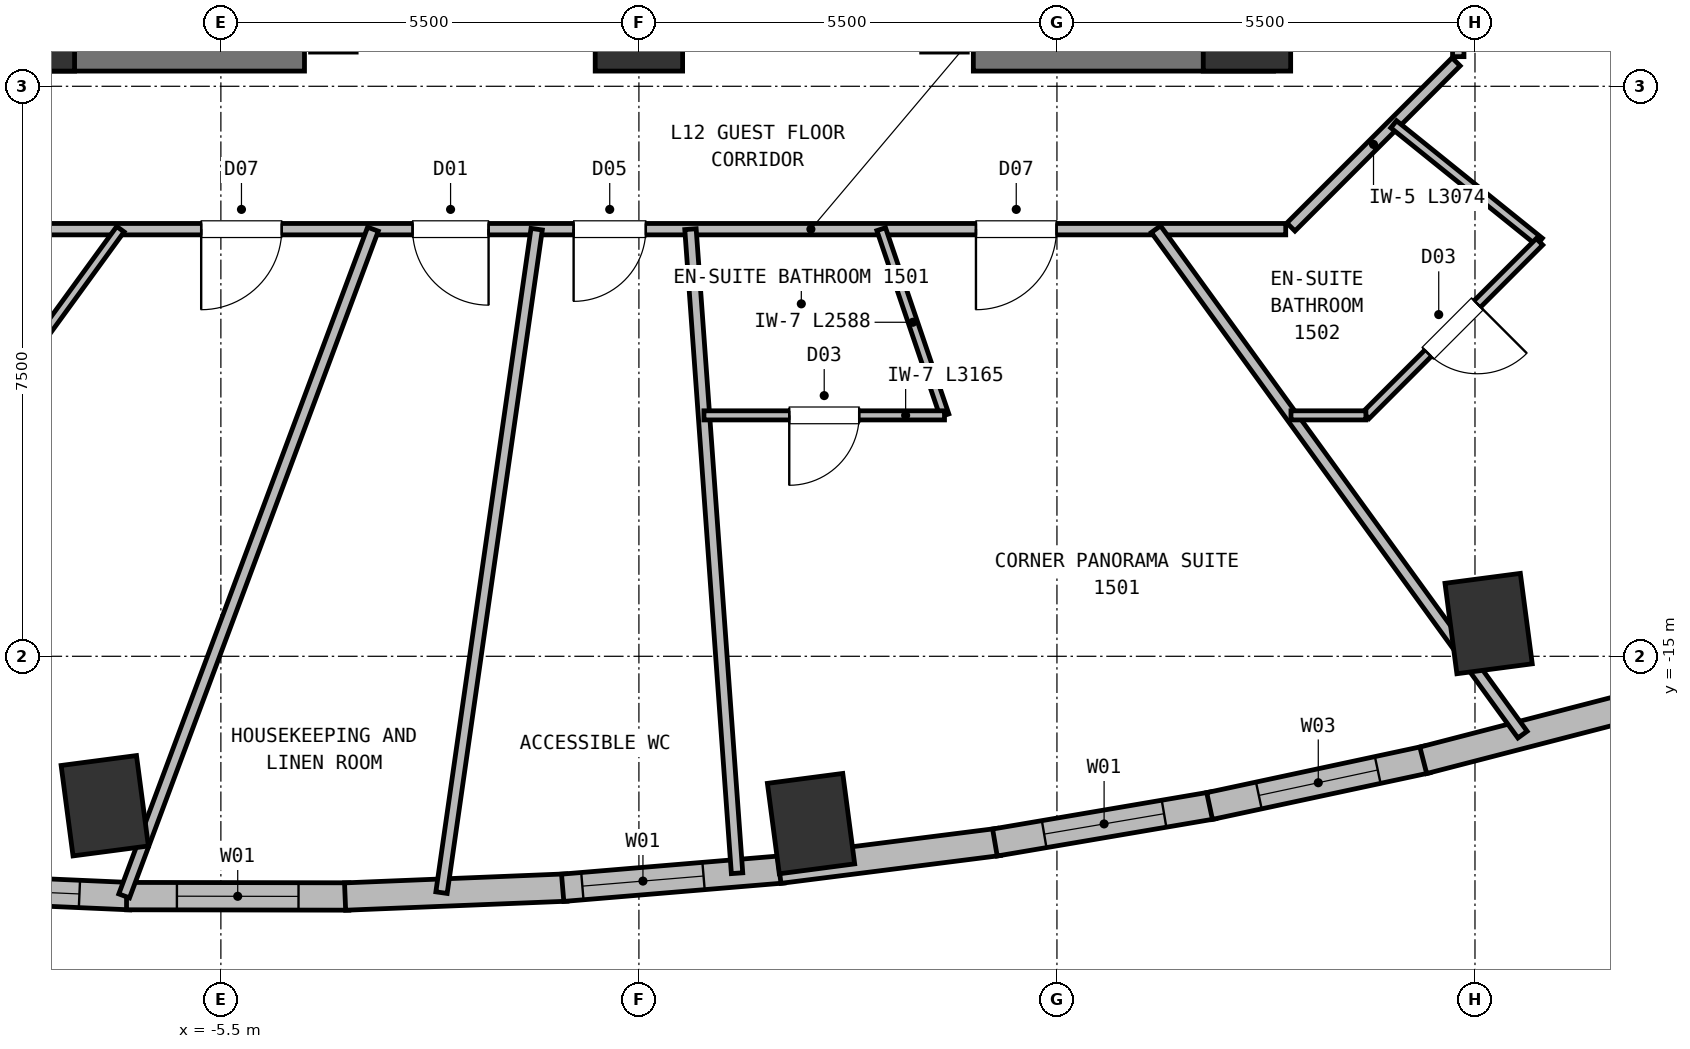
"""IFC4 building model, lengths in metres.
Left out: names, types, materials, properties, quantities, classifications, styles, units other than length and angle.
Written with IfcOpenShell. Run it as: python <this file> out.ifc"""

import sys

from ifc_helpers import new_model, si_unit, direction, frame, frame_2d, origin, origin_2d, place, context, subcontext, project, spatial, rectangle, extrude, element, fill, save


model = new_model("IFC4")
c1 = context("Model", 3, precision=1e-05, world=origin(), true_north=direction((0.0, 1.0)))
c2 = subcontext(c1, "Body", "Model", "MODEL_VIEW")
j1 = project(units=[si_unit("LENGTHUNIT", "METRE"), si_unit("PLANEANGLEUNIT", "RADIAN")], contexts=[c1])
p1 = place(None, origin())
s1 = spatial("IfcSite", under=j1, at=p1, CompositionType="ELEMENT")
p2 = place(p1, origin())
s2 = spatial("IfcBuilding", under=s1, at=p2, CompositionType="ELEMENT")
p3 = place(p2, frame((0.0, 0.0, 53.0)))
s3 = spatial("IfcBuildingStorey", under=s2, at=p3, CompositionType="ELEMENT", Elevation=53.0)
for number, where, z_axis, x_axis in (
    (1, (-8.0, -6.6, 0.0), (0.0, 0.0, 1.0), (1.0, 0.0, 0.0)),
    (2, (0.0, -6.6, 0.0), (0.0, 0.0, 1.0), (1.0, 0.0, 0.0)),
    (3, (8.0, -6.6, 0.0), (0.0, 0.0, 1.0), (1.0, 0.0, 0.0)),
):
    element("IfcColumn", number, at=place(p3, frame(where, z_axis=z_axis, x_axis=x_axis)), inside=s3, PredefinedType="COLUMN", context=c2, shape_type="SweptSolid", body=[
        extrude(rectangle(XDim=1.15, YDim=1.4, at=origin_2d()), origin(), (0.0, 0.0, 1.0), 3.75),
    ])
for number, where, z_axis, x_axis in (
    (4, (-8.35, -6.95, 0.0), (0.0, 0.0, 1.0), (1.0, 0.0, 0.0)),
    (5, (4.4, -6.95, 0.0), (0.0, 0.0, 1.0), (1.0, 0.0, 0.0)),
):
    element("IfcWall", number, at=place(p3, frame(where, z_axis=z_axis, x_axis=x_axis)), inside=s3, PredefinedType="SHEAR", context=c2, shape_type="SweptSolid", body=[
        extrude(rectangle(XDim=3.95, YDim=0.7, at=frame_2d((1.975, 0.0))), origin(), (0.0, 0.0, 1.0), 3.5),
    ])
for number, where, z_axis, x_axis in (
    (6, (-7.028, -16.966, 0.0), (0.0, 0.0, 1.0), (0.991, 0.131, 0.0)),
    (7, (2.265, -17.202, 0.0), (0.0, 0.0, 1.0), (0.991, 0.131, 0.0)),
    (8, (11.179, -14.569, 0.0), (0.0, 0.0, 1.0), (0.991, 0.131, 0.0)),
):
    element("IfcColumn", number, at=place(p3, frame(where, z_axis=z_axis, x_axis=x_axis)), inside=s3, PredefinedType="COLUMN", context=c2, shape_type="SweptSolid", body=[
        extrude(rectangle(XDim=1.0, YDim=1.2, at=origin_2d()), origin(), (0.0, 0.0, 1.0), 3.75),
    ])
p4 = place(p3, frame((-6.691, -18.156, 0.0), z_axis=(0.0, 0.0, 1.0), x_axis=(-0.999038849602, 0.043833514425, 0.0)))
e9 = element("IfcWall", 9, at=p4, inside=s3, PredefinedType="SOLIDWALL", context=c2, shape_type="SweptSolid", body=[
    extrude(rectangle(XDim=2.941, YDim=0.36, at=frame_2d((1.47, 0.0))), origin(), (0.0, 0.0, 1.0), 3.5),
])
p5 = place(p4, frame((0.67, 0.0, 0.72)))
e10 = element("IfcOpeningElement", 10, at=p5, cuts=e9, PredefinedType="OPENING", context=c2, shape_type="SweptSolid", body=[
    extrude(rectangle(XDim=1.6, YDim=1.88, at=frame_2d((0.8, 0.94))), frame((0.0, 0.19, 0.0), z_axis=(0.0, -1.0, 0.0), x_axis=(1.0, 0.0, 0.0)), (0.0, 0.0, 1.0), 0.38),
])
p6 = place(p3, frame((-3.816, -18.16, 0.0), z_axis=(0.0, 0.0, 1.0), x_axis=(-0.999998606938, 0.001669168097, 0.0)))
e11 = element("IfcWall", 11, at=p6, inside=s3, PredefinedType="SOLIDWALL", context=c2, shape_type="SweptSolid", body=[
    extrude(rectangle(XDim=2.925, YDim=0.36, at=frame_2d((1.463, 0.0))), origin(), (0.0, 0.0, 1.0), 3.5),
])
p7 = place(p6, frame((0.663, 0.0, 0.72)))
e12 = element("IfcOpeningElement", 12, at=p7, cuts=e11, PredefinedType="OPENING", context=c2, shape_type="SweptSolid", body=[
    extrude(rectangle(XDim=1.6, YDim=1.88, at=frame_2d((0.8, 0.94))), frame((0.0, 0.19, 0.0), z_axis=(0.0, -1.0, 0.0), x_axis=(1.0, 0.0, 0.0)), (0.0, 0.0, 1.0), 0.38),
])
p8 = place(p3, frame((-0.953, -18.043, 0.0), z_axis=(0.0, 0.0, 1.0), x_axis=(-0.99917451841, -0.040623660108, 0.0)))
e13 = element("IfcWall", 13, at=p8, inside=s3, PredefinedType="SOLIDWALL", context=c2, shape_type="SweptSolid", body=[
    extrude(rectangle(XDim=2.915, YDim=0.36, at=frame_2d((1.458, 0.0))), origin(), (0.0, 0.0, 1.0), 3.5),
])
p9 = place(p3, frame((1.896, -17.804, 0.0), z_axis=(0.0, 0.0, 1.0), x_axis=(-0.996530117069, -0.08323296086, 0.0)))
e14 = element("IfcWall", 14, at=p9, inside=s3, PredefinedType="SOLIDWALL", context=c2, shape_type="SweptSolid", body=[
    extrude(rectangle(XDim=2.91, YDim=0.36, at=frame_2d((1.455, 0.0))), origin(), (0.0, 0.0, 1.0), 3.5),
])
p10 = place(p9, frame((1.05, 0.0, 0.72)))
e15 = element("IfcOpeningElement", 15, at=p10, cuts=e14, PredefinedType="OPENING", context=c2, shape_type="SweptSolid", body=[
    extrude(rectangle(XDim=1.6, YDim=1.88, at=frame_2d((0.8, 0.94))), frame((0.0, 0.19, 0.0), z_axis=(0.0, -1.0, 0.0), x_axis=(1.0, 0.0, 0.0)), (0.0, 0.0, 1.0), 0.38),
])
p11 = place(p3, frame((4.733, -17.443, 0.0), z_axis=(0.0, 0.0, 1.0), x_axis=(-0.992068644888, -0.125697270578, 0.0)))
e16 = element("IfcWall", 16, at=p11, inside=s3, PredefinedType="SOLIDWALL", context=c2, shape_type="SweptSolid", body=[
    extrude(rectangle(XDim=2.91, YDim=0.36, at=frame_2d((1.455, 0.0))), origin(), (0.0, 0.0, 1.0), 3.5),
])
p12 = place(p3, frame((7.557, -16.961, 0.0), z_axis=(0.0, 0.0, 1.0), x_axis=(-0.985782819652, -0.168024499637, 0.0)))
e17 = element("IfcWall", 17, at=p12, inside=s3, PredefinedType="SOLIDWALL", context=c2, shape_type="SweptSolid", body=[
    extrude(rectangle(XDim=2.915, YDim=0.36, at=frame_2d((1.458, 0.0))), origin(), (0.0, 0.0, 1.0), 3.5),
])
p13 = place(p12, frame((0.657, 0.0, 0.72)))
e18 = element("IfcOpeningElement", 18, at=p13, cuts=e17, PredefinedType="OPENING", context=c2, shape_type="SweptSolid", body=[
    extrude(rectangle(XDim=1.6, YDim=1.88, at=frame_2d((0.8, 0.94))), frame((0.0, 0.19, 0.0), z_axis=(0.0, -1.0, 0.0), x_axis=(1.0, 0.0, 0.0)), (0.0, 0.0, 1.0), 0.38),
])
p14 = place(p3, frame((10.368, -16.357, 0.0), z_axis=(0.0, 0.0, 1.0), x_axis=(-0.977791419792, -0.209580388826, 0.0)))
e19 = element("IfcWall", 19, at=p14, inside=s3, PredefinedType="SOLIDWALL", context=c2, shape_type="SweptSolid", body=[
    extrude(rectangle(XDim=2.925, YDim=0.36, at=frame_2d((1.462, 0.0))), origin(), (0.0, 0.0, 1.0), 3.5),
])
p15 = place(p14, frame((0.663, 0.0, 0.72)))
e20 = element("IfcOpeningElement", 20, at=p15, cuts=e19, PredefinedType="OPENING", context=c2, shape_type="SweptSolid", body=[
    extrude(rectangle(XDim=1.6, YDim=1.88, at=frame_2d((0.8, 0.94))), frame((0.0, 0.19, 0.0), z_axis=(0.0, -1.0, 0.0), x_axis=(1.0, 0.0, 0.0)), (0.0, 0.0, 1.0), 0.38),
])
p16 = place(p3, frame((13.167, -15.632, 0.0), z_axis=(0.0, 0.0, 1.0), x_axis=(-0.968087209766, -0.250613555675, 0.0)))
e21 = element("IfcWall", 21, at=p16, inside=s3, PredefinedType="SOLIDWALL", context=c2, shape_type="SweptSolid", body=[
    extrude(rectangle(XDim=2.941, YDim=0.36, at=frame_2d((1.47, 0.0))), origin(), (0.0, 0.0, 1.0), 3.5),
])
p17 = place(p3, frame((8.51, -9.38, 0.0), z_axis=(0.0, 0.0, 1.0), x_axis=(-1.0, 0.0, 0.0)))
e22 = element("IfcWall", 22, at=p17, inside=s3, PredefinedType="PARTITIONING", context=c2, shape_type="SweptSolid", body=[
    extrude(rectangle(XDim=17.02, YDim=0.15, at=frame_2d((8.51, 0.0))), origin(), (0.0, 0.0, 1.0), 3.5),
])
p18 = place(p17, frame((8.419, 0.0, 0.0)))
e23 = element("IfcOpeningElement", 23, at=p18, cuts=e22, PredefinedType="OPENING", context=c2, shape_type="SweptSolid", body=[
    extrude(rectangle(XDim=0.95, YDim=2.1, at=frame_2d((0.475, 1.05))), frame((0.0, 0.085, 0.0), z_axis=(0.0, -1.0, 0.0), x_axis=(1.0, 0.0, 0.0)), (0.0, 0.0, 1.0), 0.17),
])
p19 = place(p17, frame((10.488, 0.0, 0.0)))
e24 = element("IfcOpeningElement", 24, at=p19, cuts=e22, PredefinedType="OPENING", context=c2, shape_type="SweptSolid", body=[
    extrude(rectangle(XDim=1.0, YDim=2.15, at=frame_2d((0.5, 1.075))), frame((0.0, 0.085, 0.0), z_axis=(0.0, -1.0, 0.0), x_axis=(1.0, 0.0, 0.0)), (0.0, 0.0, 1.0), 0.17),
])
p20 = place(p17, frame((3.015, 0.0, 0.0)))
e25 = element("IfcOpeningElement", 25, at=p20, cuts=e22, PredefinedType="OPENING", context=c2, shape_type="SweptSolid", body=[
    extrude(rectangle(XDim=1.06, YDim=2.15, at=frame_2d((0.53, 1.075))), frame((0.0, 0.085, 0.0), z_axis=(0.0, -1.0, 0.0), x_axis=(1.0, 0.0, 0.0)), (0.0, 0.0, 1.0), 0.17),
])
p21 = place(p17, frame((13.209, 0.0, 0.0)))
e26 = element("IfcOpeningElement", 26, at=p21, cuts=e22, PredefinedType="OPENING", context=c2, shape_type="SweptSolid", body=[
    extrude(rectangle(XDim=1.06, YDim=2.15, at=frame_2d((0.53, 1.075))), frame((0.0, 0.085, 0.0), z_axis=(0.0, -1.0, 0.0), x_axis=(1.0, 0.0, 0.0)), (0.0, 0.0, 1.0), 0.17),
])
p22 = place(p3, frame((10.752, -7.178, 0.0), z_axis=(0.0, 0.0, 1.0), x_axis=(-0.707067066127, -0.707146494016, 0.0)))
e27 = element("IfcWall", 27, at=p22, inside=s3, PredefinedType="PARTITIONING", context=c2, shape_type="SweptSolid", body=[
    extrude(rectangle(XDim=3.074, YDim=0.15, at=frame_2d((1.537, 0.0))), origin(), (0.0, 0.0, 1.0), 3.12),
])
p23 = place(p3, frame((10.78, 7.11, 0.0), z_axis=(0.0, 0.0, 1.0), x_axis=(0.0, -1.0, 0.0)))
e28 = element("IfcWall", 28, at=p23, inside=s3, PredefinedType="PARTITIONING", context=c2, shape_type="SweptSolid", body=[
    extrude(rectangle(XDim=14.22, YDim=0.15, at=frame_2d((7.11, 0.0))), origin(), (0.0, 0.0, 1.0), 3.12),
])
p24 = place(p23, frame((2.217, 0.0, 0.0)))
e29 = element("IfcOpeningElement", 29, at=p24, cuts=e28, PredefinedType="OPENING", context=c2, shape_type="SweptSolid", body=[
    extrude(rectangle(XDim=1.0, YDim=2.15, at=frame_2d((0.5, 1.075))), frame((0.0, 0.085, 0.0), z_axis=(0.0, -1.0, 0.0), x_axis=(1.0, 0.0, 0.0)), (0.0, 0.0, 1.0), 0.17),
])
p25 = place(p23, frame((6.276, 0.0, 0.0)))
e30 = element("IfcOpeningElement", 30, at=p25, cuts=e28, PredefinedType="OPENING", context=c2, shape_type="SweptSolid", body=[
    extrude(rectangle(XDim=1.06, YDim=2.15, at=frame_2d((0.53, 1.075))), frame((0.0, 0.085, 0.0), z_axis=(0.0, -1.0, 0.0), x_axis=(1.0, 0.0, 0.0)), (0.0, 0.0, 1.0), 0.17),
])
p26 = place(p23, frame((12.156, 0.0, 0.0)))
e31 = element("IfcOpeningElement", 31, at=p26, cuts=e28, PredefinedType="OPENING", context=c2, shape_type="SweptSolid", body=[
    extrude(rectangle(XDim=1.06, YDim=2.15, at=frame_2d((0.53, 1.075))), frame((0.0, 0.085, 0.0), z_axis=(0.0, -1.0, 0.0), x_axis=(1.0, 0.0, 0.0)), (0.0, 0.0, 1.0), 0.17),
])
p27 = place(p3, frame((0.678, -9.38, 0.0), z_axis=(0.0, 0.0, 1.0), x_axis=(0.072123053532, -0.997395741493, 0.0)))
e32 = element("IfcWall", 32, at=p27, inside=s3, PredefinedType="PARTITIONING", context=c2, shape_type="SweptSolid", body=[
    extrude(rectangle(XDim=8.497, YDim=0.15, at=frame_2d((4.248, 0.0))), origin(), (0.0, 0.0, 1.0), 3.5),
])
p28 = place(p3, frame((3.188, -9.38, 0.0), z_axis=(0.0, 0.0, 1.0), x_axis=(0.321797870112, -0.946808391804, 0.0)))
e33 = element("IfcWall", 33, at=p28, inside=s3, PredefinedType="PARTITIONING", context=c2, shape_type="SweptSolid", body=[
    extrude(rectangle(XDim=2.588, YDim=0.12, at=frame_2d((1.294, 0.0))), origin(), (0.0, 0.0, 1.0), 3.5),
])
p29 = place(p3, frame((4.021, -11.83, 0.0), z_axis=(0.0, 0.0, 1.0), x_axis=(-1.0, 0.0, 0.0)))
e34 = element("IfcWall", 34, at=p29, inside=s3, PredefinedType="PARTITIONING", context=c2, shape_type="SweptSolid", body=[
    extrude(rectangle(XDim=3.165, YDim=0.12, at=frame_2d((1.583, 0.0))), origin(), (0.0, 0.0, 1.0), 3.5),
])
p30 = place(p29, frame((1.123, 0.0, 0.0)))
e35 = element("IfcOpeningElement", 35, at=p30, cuts=e34, PredefinedType="OPENING", context=c2, shape_type="SweptSolid", body=[
    extrude(rectangle(XDim=0.92, YDim=2.1, at=frame_2d((0.46, 1.05))), frame((0.0, 0.07, 0.0), z_axis=(0.0, -1.0, 0.0), x_axis=(1.0, 0.0, 0.0)), (0.0, 0.0, 1.0), 0.14),
])
p31 = place(p3, frame((6.802, -9.38, 0.0), z_axis=(0.0, 0.0, 1.0), x_axis=(0.587056194983, -0.80954618394, 0.0)))
e36 = element("IfcWall", 36, at=p31, inside=s3, PredefinedType="PARTITIONING", context=c2, shape_type="SweptSolid", body=[
    extrude(rectangle(XDim=8.216, YDim=0.15, at=frame_2d((4.108, 0.0))), origin(), (0.0, 0.0, 1.0), 3.5),
])
p32 = place(p3, frame((9.93, -8.0, 0.0), z_axis=(0.0, 0.0, 1.0), x_axis=(0.778737774775, -0.627349566142, 0.0)))
e37 = element("IfcWall", 37, at=p32, inside=s3, PredefinedType="PARTITIONING", context=c2, shape_type="SweptSolid", body=[
    extrude(rectangle(XDim=2.464, YDim=0.12, at=frame_2d((1.232, 0.0))), origin(), (0.0, 0.0, 1.0), 3.5),
])
p33 = place(p3, frame((11.849, -9.546, 0.0), z_axis=(0.0, 0.0, 1.0), x_axis=(-0.707144567105, -0.707068993249, 0.0)))
e38 = element("IfcWall", 38, at=p33, inside=s3, PredefinedType="PARTITIONING", context=c2, shape_type="SweptSolid", body=[
    extrude(rectangle(XDim=3.23, YDim=0.12, at=frame_2d((1.615, 0.0))), origin(), (0.0, 0.0, 1.0), 3.5),
])
p34 = place(p33, frame((1.155, 0.0, 0.0)))
e39 = element("IfcOpeningElement", 39, at=p34, cuts=e38, PredefinedType="OPENING", context=c2, shape_type="SweptSolid", body=[
    extrude(rectangle(XDim=0.92, YDim=2.1, at=frame_2d((0.46, 1.05))), frame((0.0, 0.07, 0.0), z_axis=(0.0, -1.0, 0.0), x_axis=(1.0, 0.0, 0.0)), (0.0, 0.0, 1.0), 0.14),
])
p35 = place(p3, frame((8.579, -11.83, 0.0), z_axis=(0.0, 0.0, 1.0), x_axis=(1.0, 0.0, 0.0)))
e40 = element("IfcWall", 40, at=p35, inside=s3, PredefinedType="PARTITIONING", context=c2, shape_type="SweptSolid", body=[
    extrude(rectangle(XDim=0.986, YDim=0.12, at=frame_2d((0.493, 0.0))), origin(), (0.0, 0.0, 1.0), 3.5),
])
p36 = place(p3, frame((10.78, -4.142, 0.0), z_axis=(0.0, 0.0, 1.0), x_axis=(0.933466701783, -0.358664072166, 0.0)))
e41 = element("IfcWall", 41, at=p36, inside=s3, PredefinedType="PARTITIONING", context=c2, shape_type="SweptSolid", body=[
    extrude(rectangle(XDim=13.919, YDim=0.15, at=frame_2d((6.96, 0.0))), origin(), (0.0, 0.0, 1.0), 3.5),
])
p37 = place(p3, frame((-8.604, -11.83, 0.0), z_axis=(0.0, 0.0, 1.0), x_axis=(0.58812378006, 0.808770931307, 0.0)))
e42 = element("IfcWall", 42, at=p37, inside=s3, PredefinedType="PARTITIONING", context=c2, shape_type="SweptSolid", body=[
    extrude(rectangle(XDim=3.03, YDim=0.12, at=frame_2d((1.515, 0.0))), origin(), (0.0, 0.0, 1.0), 3.5),
])
p38 = place(p3, frame((-3.5, -9.38, 0.0), z_axis=(0.0, 0.0, 1.0), x_axis=(-0.349539963134, -0.936921455711, 0.0)))
e43 = element("IfcWall", 43, at=p38, inside=s3, PredefinedType="PARTITIONING", context=c2, shape_type="SweptSolid", body=[
    extrude(rectangle(XDim=9.364, YDim=0.15, at=frame_2d((4.682, 0.0))), origin(), (0.0, 0.0, 1.0), 3.5),
])
p39 = place(p3, frame((-1.345, -9.38, 0.0), z_axis=(0.0, 0.0, 1.0), x_axis=(-0.141956162639, -0.989872945326, 0.0)))
e44 = element("IfcWall", 44, at=p39, inside=s3, PredefinedType="PARTITIONING", context=c2, shape_type="SweptSolid", body=[
    extrude(rectangle(XDim=8.819, YDim=0.15, at=frame_2d((4.41, 0.0))), origin(), (0.0, 0.0, 1.0), 3.5),
])
p40 = place(p5, origin())
e45 = element("IfcWindow", 45, at=p40, inside=s3, PartitioningType="SINGLE_PANEL", PredefinedType="WINDOW", context=c2, shape_type="SweptSolid", body=[
    extrude(rectangle(XDim=1.6, YDim=1.88, at=frame_2d((0.8, 0.94))), frame((0.0, 0.03, 0.0), z_axis=(0.0, -1.0, 0.0), x_axis=(1.0, 0.0, 0.0)), (0.0, 0.0, 1.0), 0.06),
])
fill(e10, e45)
p41 = place(p7, origin())
e46 = element("IfcWindow", 46, at=p41, inside=s3, PartitioningType="SINGLE_PANEL", PredefinedType="WINDOW", context=c2, shape_type="SweptSolid", body=[
    extrude(rectangle(XDim=1.6, YDim=1.88, at=frame_2d((0.8, 0.94))), frame((0.0, 0.03, 0.0), z_axis=(0.0, -1.0, 0.0), x_axis=(1.0, 0.0, 0.0)), (0.0, 0.0, 1.0), 0.06),
])
fill(e12, e46)
p42 = place(p10, origin())
e47 = element("IfcWindow", 47, at=p42, inside=s3, PartitioningType="SINGLE_PANEL", PredefinedType="WINDOW", context=c2, shape_type="SweptSolid", body=[
    extrude(rectangle(XDim=1.6, YDim=1.88, at=frame_2d((0.8, 0.94))), frame((0.0, 0.03, 0.0), z_axis=(0.0, -1.0, 0.0), x_axis=(1.0, 0.0, 0.0)), (0.0, 0.0, 1.0), 0.06),
])
fill(e15, e47)
p43 = place(p13, origin())
e48 = element("IfcWindow", 48, at=p43, inside=s3, PartitioningType="SINGLE_PANEL", PredefinedType="WINDOW", context=c2, shape_type="SweptSolid", body=[
    extrude(rectangle(XDim=1.6, YDim=1.88, at=frame_2d((0.8, 0.94))), frame((0.0, 0.03, 0.0), z_axis=(0.0, -1.0, 0.0), x_axis=(1.0, 0.0, 0.0)), (0.0, 0.0, 1.0), 0.06),
])
fill(e18, e48)
p44 = place(p15, origin())
e49 = element("IfcWindow", 49, at=p44, inside=s3, PartitioningType="SINGLE_PANEL", PredefinedType="WINDOW", context=c2, shape_type="SweptSolid", body=[
    extrude(rectangle(XDim=1.6, YDim=1.88, at=frame_2d((0.8, 0.94))), frame((0.0, 0.03, 0.0), z_axis=(0.0, -1.0, 0.0), x_axis=(1.0, 0.0, 0.0)), (0.0, 0.0, 1.0), 0.06),
])
fill(e20, e49)
p45 = place(p30, origin())
e50 = element("IfcDoor", 50, at=p45, inside=s3, OperationType="SINGLE_SWING_RIGHT", PredefinedType="DOOR", context=c2, shape_type="SweptSolid", body=[
    extrude(rectangle(XDim=0.92, YDim=2.1, at=frame_2d((0.46, 1.05))), frame((0.0, 0.025, 0.0), z_axis=(0.0, -1.0, 0.0), x_axis=(1.0, 0.0, 0.0)), (0.0, 0.0, 1.0), 0.05),
])
fill(e35, e50)
p46 = place(p34, origin())
e51 = element("IfcDoor", 51, at=p46, inside=s3, OperationType="SINGLE_SWING_LEFT", PredefinedType="DOOR", context=c2, shape_type="SweptSolid", body=[
    extrude(rectangle(XDim=0.92, YDim=2.1, at=frame_2d((0.46, 1.05))), frame((0.0, 0.025, 0.0), z_axis=(0.0, -1.0, 0.0), x_axis=(1.0, 0.0, 0.0)), (0.0, 0.0, 1.0), 0.05),
])
fill(e39, e51)
p47 = place(p18, origin())
e52 = element("IfcDoor", 52, at=p47, inside=s3, OperationType="SINGLE_SWING_RIGHT", PredefinedType="DOOR", context=c2, shape_type="SweptSolid", body=[
    extrude(rectangle(XDim=0.95, YDim=2.1, at=frame_2d((0.475, 1.05))), frame((0.0, 0.025, 0.0), z_axis=(0.0, -1.0, 0.0), x_axis=(1.0, 0.0, 0.0)), (0.0, 0.0, 1.0), 0.05),
])
fill(e23, e52)
p48 = place(p19, origin())
e53 = element("IfcDoor", 53, at=p48, inside=s3, OperationType="SINGLE_SWING_LEFT", PredefinedType="DOOR", context=c2, shape_type="SweptSolid", body=[
    extrude(rectangle(XDim=1.0, YDim=2.15, at=frame_2d((0.5, 1.075))), frame((0.0, 0.025, 0.0), z_axis=(0.0, -1.0, 0.0), x_axis=(1.0, 0.0, 0.0)), (0.0, 0.0, 1.0), 0.05),
])
fill(e24, e53)
p49 = place(p20, origin())
e54 = element("IfcDoor", 54, at=p49, inside=s3, OperationType="SINGLE_SWING_RIGHT", PredefinedType="DOOR", context=c2, shape_type="SweptSolid", body=[
    extrude(rectangle(XDim=1.06, YDim=2.15, at=frame_2d((0.53, 1.075))), frame((0.0, 0.025, 0.0), z_axis=(0.0, -1.0, 0.0), x_axis=(1.0, 0.0, 0.0)), (0.0, 0.0, 1.0), 0.05),
])
fill(e25, e54)
p50 = place(p21, origin())
e55 = element("IfcDoor", 55, at=p50, inside=s3, OperationType="SINGLE_SWING_RIGHT", PredefinedType="DOOR", context=c2, shape_type="SweptSolid", body=[
    extrude(rectangle(XDim=1.06, YDim=2.15, at=frame_2d((0.53, 1.075))), frame((0.0, 0.025, 0.0), z_axis=(0.0, -1.0, 0.0), x_axis=(1.0, 0.0, 0.0)), (0.0, 0.0, 1.0), 0.05),
])
fill(e26, e55)
save(model, sys.argv[1])
